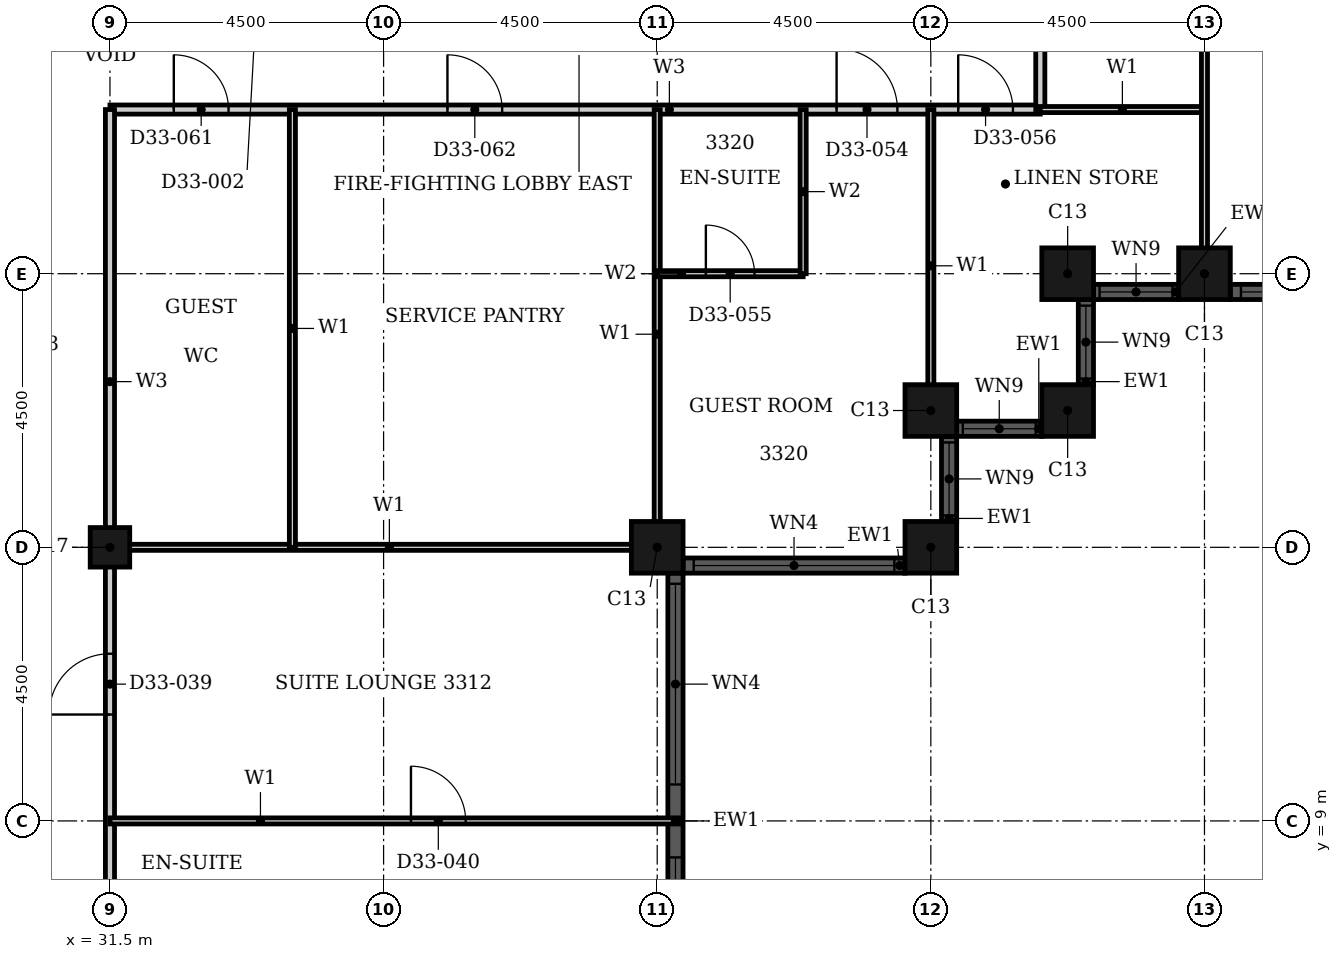
"""IFC4 building model, lengths in metres.
Left out: names, types, materials, properties, quantities, classifications, styles, units other than length and angle.
Written with IfcOpenShell. Run it as: python <this file> out.ifc"""

import sys

from ifc_helpers import new_model, si_unit, direction, frame, frame_2d, origin, origin_2d, place, context, subcontext, project, spatial, rectangle, hollow_rectangle, extrude, element, fill, save


model = new_model("IFC4")
c1 = context("Model", 3, precision=1e-05, world=origin(), true_north=direction((0.0, 1.0)))
c2 = subcontext(c1, "Body", "Model", "MODEL_VIEW")
j1 = project(units=[si_unit("LENGTHUNIT", "METRE"), si_unit("PLANEANGLEUNIT", "RADIAN")], contexts=[c1])
p1 = place(None, origin())
s1 = spatial("IfcSite", under=j1, at=p1, CompositionType="ELEMENT")
p2 = place(p1, origin())
s2 = spatial("IfcBuilding", under=s1, at=p2, CompositionType="ELEMENT")
p3 = place(p2, frame((0.0, 0.0, 133.2)))
s3 = spatial("IfcBuildingStorey", under=s2, at=p3, CompositionType="ELEMENT", Elevation=133.2)
for number, where, z_axis, x_axis in (
    (1, (40.5, 13.5, 0.0), (0.0, 0.0, 1.0), (1.0, 0.0, 0.0)),
    (2, (45.0, 13.5, 0.0), (0.0, 0.0, 1.0), (1.0, 0.0, 0.0)),
    (3, (45.0, 15.75, 0.0), (0.0, 0.0, 1.0), (1.0, 0.0, 0.0)),
    (4, (47.25, 15.75, 0.0), (0.0, 0.0, 1.0), (1.0, 0.0, 0.0)),
    (5, (47.25, 18.0, 0.0), (0.0, 0.0, 1.0), (1.0, 0.0, 0.0)),
    (6, (49.5, 18.0, 0.0), (0.0, 0.0, 1.0), (1.0, 0.0, 0.0)),
):
    element("IfcColumn", number, at=place(p3, frame(where, z_axis=z_axis, x_axis=x_axis)), inside=s3, PredefinedType="COLUMN", context=c2, shape_type="SweptSolid", body=[
        extrude(hollow_rectangle(XDim=0.85, YDim=0.85, WallThickness=0.026, at=origin_2d()), origin(), (0.0, 0.0, 1.0), 3.6),
    ])
p4 = place(p3, frame((31.5, 13.5, 0.0), z_axis=(0.0, 0.0, 1.0), x_axis=(1.0, 0.0, 0.0)))
e7 = element("IfcColumn", 7, at=p4, inside=s3, PredefinedType="COLUMN", context=c2, shape_type="SweptSolid", body=[
    extrude(hollow_rectangle(XDim=0.65, YDim=0.65, WallThickness=0.021, at=origin_2d()), origin(), (0.0, 0.0, 1.0), 3.6),
])
p5 = place(p3, frame((40.8, 4.925, 0.0), z_axis=(0.0, 0.0, 1.0), x_axis=(0.0, 1.0, 0.0)))
e8 = element("IfcWall", 8, at=p5, inside=s3, PredefinedType="SOLIDWALL", context=c2, shape_type="SweptSolid", body=[
    extrude(rectangle(XDim=8.15, YDim=0.25, at=frame_2d((4.075, 0.0))), origin(), (0.0, 0.0, 1.0), 3.6),
])
p6 = place(p5, frame((0.175, 0.0, 0.9)))
e9 = element("IfcOpeningElement", 9, at=p6, cuts=e8, PredefinedType="OPENING", context=c2, shape_type="SweptSolid", body=[
    extrude(rectangle(XDim=3.3, YDim=2.08, at=frame_2d((1.65, 1.04))), frame((0.0, 0.135, 0.0), z_axis=(0.0, -1.0, 0.0), x_axis=(1.0, 0.0, 0.0)), (0.0, 0.0, 1.0), 0.27),
])
p7 = place(p5, frame((4.675, 0.0, 0.9)))
e10 = element("IfcOpeningElement", 10, at=p7, cuts=e8, PredefinedType="OPENING", context=c2, shape_type="SweptSolid", body=[
    extrude(rectangle(XDim=3.3, YDim=2.08, at=frame_2d((1.65, 1.04))), frame((0.0, 0.135, 0.0), z_axis=(0.0, -1.0, 0.0), x_axis=(1.0, 0.0, 0.0)), (0.0, 0.0, 1.0), 0.27),
])
p8 = place(p3, frame((40.925, 13.2, 0.0), z_axis=(0.0, 0.0, 1.0), x_axis=(1.0, 0.0, 0.0)))
e11 = element("IfcWall", 11, at=p8, inside=s3, PredefinedType="SOLIDWALL", context=c2, shape_type="SweptSolid", body=[
    extrude(rectangle(XDim=3.65, YDim=0.25, at=frame_2d((1.825, 0.0))), origin(), (0.0, 0.0, 1.0), 3.6),
])
p9 = place(p8, frame((0.175, 0.0, 0.9)))
e12 = element("IfcOpeningElement", 12, at=p9, cuts=e11, PredefinedType="OPENING", context=c2, shape_type="SweptSolid", body=[
    extrude(rectangle(XDim=3.3, YDim=2.08, at=frame_2d((1.65, 1.04))), frame((0.0, 0.135, 0.0), z_axis=(0.0, -1.0, 0.0), x_axis=(1.0, 0.0, 0.0)), (0.0, 0.0, 1.0), 0.27),
])
p10 = place(p3, frame((45.3, 13.925, 0.0), z_axis=(0.0, 0.0, 1.0), x_axis=(0.0, 1.0, 0.0)))
e13 = element("IfcWall", 13, at=p10, inside=s3, PredefinedType="SOLIDWALL", context=c2, shape_type="SweptSolid", body=[
    extrude(rectangle(XDim=1.4, YDim=0.25, at=frame_2d((0.7, 0.0))), origin(), (0.0, 0.0, 1.0), 3.6),
])
p11 = place(p10, frame((0.1, 0.0, 0.9)))
e14 = element("IfcOpeningElement", 14, at=p11, cuts=e13, PredefinedType="OPENING", context=c2, shape_type="SweptSolid", body=[
    extrude(rectangle(XDim=1.2, YDim=2.08, at=frame_2d((0.6, 1.04))), frame((0.0, 0.135, 0.0), z_axis=(0.0, -1.0, 0.0), x_axis=(1.0, 0.0, 0.0)), (0.0, 0.0, 1.0), 0.27),
])
p12 = place(p3, frame((45.425, 15.45, 0.0), z_axis=(0.0, 0.0, 1.0), x_axis=(1.0, 0.0, 0.0)))
e15 = element("IfcWall", 15, at=p12, inside=s3, PredefinedType="SOLIDWALL", context=c2, shape_type="SweptSolid", body=[
    extrude(rectangle(XDim=1.4, YDim=0.25, at=frame_2d((0.7, 0.0))), origin(), (0.0, 0.0, 1.0), 3.6),
])
p13 = place(p12, frame((0.1, 0.0, 0.9)))
e16 = element("IfcOpeningElement", 16, at=p13, cuts=e15, PredefinedType="OPENING", context=c2, shape_type="SweptSolid", body=[
    extrude(rectangle(XDim=1.2, YDim=2.08, at=frame_2d((0.6, 1.04))), frame((0.0, 0.135, 0.0), z_axis=(0.0, -1.0, 0.0), x_axis=(1.0, 0.0, 0.0)), (0.0, 0.0, 1.0), 0.27),
])
p14 = place(p3, frame((47.55, 16.175, 0.0), z_axis=(0.0, 0.0, 1.0), x_axis=(0.0, 1.0, 0.0)))
e17 = element("IfcWall", 17, at=p14, inside=s3, PredefinedType="SOLIDWALL", context=c2, shape_type="SweptSolid", body=[
    extrude(rectangle(XDim=1.4, YDim=0.25, at=frame_2d((0.7, 0.0))), origin(), (0.0, 0.0, 1.0), 3.6),
])
p15 = place(p14, frame((0.1, 0.0, 0.9)))
e18 = element("IfcOpeningElement", 18, at=p15, cuts=e17, PredefinedType="OPENING", context=c2, shape_type="SweptSolid", body=[
    extrude(rectangle(XDim=1.2, YDim=2.08, at=frame_2d((0.6, 1.04))), frame((0.0, 0.135, 0.0), z_axis=(0.0, -1.0, 0.0), x_axis=(1.0, 0.0, 0.0)), (0.0, 0.0, 1.0), 0.27),
])
p16 = place(p3, frame((47.675, 17.7, 0.0), z_axis=(0.0, 0.0, 1.0), x_axis=(1.0, 0.0, 0.0)))
e19 = element("IfcWall", 19, at=p16, inside=s3, PredefinedType="SOLIDWALL", context=c2, shape_type="SweptSolid", body=[
    extrude(rectangle(XDim=1.4, YDim=0.25, at=frame_2d((0.7, 0.0))), origin(), (0.0, 0.0, 1.0), 3.6),
])
p17 = place(p16, frame((0.1, 0.0, 0.9)))
e20 = element("IfcOpeningElement", 20, at=p17, cuts=e19, PredefinedType="OPENING", context=c2, shape_type="SweptSolid", body=[
    extrude(rectangle(XDim=1.2, YDim=2.08, at=frame_2d((0.6, 1.04))), frame((0.0, 0.135, 0.0), z_axis=(0.0, -1.0, 0.0), x_axis=(1.0, 0.0, 0.0)), (0.0, 0.0, 1.0), 0.27),
])
p18 = place(p3, frame((49.925, 17.7, 0.0), z_axis=(0.0, 0.0, 1.0), x_axis=(1.0, 0.0, 0.0)))
e21 = element("IfcWall", 21, at=p18, inside=s3, PredefinedType="SOLIDWALL", context=c2, shape_type="SweptSolid", body=[
    extrude(rectangle(XDim=8.15, YDim=0.25, at=frame_2d((4.075, 0.0))), origin(), (0.0, 0.0, 1.0), 3.6),
])
p19 = place(p18, frame((0.175, 0.0, 0.9)))
e22 = element("IfcOpeningElement", 22, at=p19, cuts=e21, PredefinedType="OPENING", context=c2, shape_type="SweptSolid", body=[
    extrude(rectangle(XDim=3.3, YDim=2.08, at=frame_2d((1.65, 1.04))), frame((0.0, 0.135, 0.0), z_axis=(0.0, -1.0, 0.0), x_axis=(1.0, 0.0, 0.0)), (0.0, 0.0, 1.0), 0.27),
])
p20 = place(p18, frame((4.675, 0.0, 0.9)))
e23 = element("IfcOpeningElement", 23, at=p20, cuts=e21, PredefinedType="OPENING", context=c2, shape_type="SweptSolid", body=[
    extrude(rectangle(XDim=3.3, YDim=2.08, at=frame_2d((1.65, 1.04))), frame((0.0, 0.135, 0.0), z_axis=(0.0, -1.0, 0.0), x_axis=(1.0, 0.0, 0.0)), (0.0, 0.0, 1.0), 0.27),
])
p21 = place(p3, frame((31.5, 20.7, 0.0), z_axis=(0.0, 0.0, 1.0), x_axis=(1.0, 0.0, 0.0)))
e24 = element("IfcWall", 24, at=p21, inside=s3, PredefinedType="PARTITIONING", context=c2, shape_type="SweptSolid", body=[
    extrude(rectangle(XDim=15.3, YDim=0.15, at=frame_2d((7.65, 0.0))), origin(), (0.0, 0.0, 1.0), 3.3),
])
p22 = place(p21, frame((11.95, 0.0, 0.0)))
e25 = element("IfcOpeningElement", 25, at=p22, cuts=e24, PredefinedType="OPENING", context=c2, shape_type="SweptSolid", body=[
    extrude(rectangle(XDim=1.0, YDim=2.1, at=frame_2d((0.5, 1.05))), frame((0.0, 0.085, 0.0), z_axis=(0.0, -1.0, 0.0), x_axis=(1.0, 0.0, 0.0)), (0.0, 0.0, 1.0), 0.17),
])
p23 = place(p21, frame((13.95, 0.0, 0.0)))
e26 = element("IfcOpeningElement", 26, at=p23, cuts=e24, PredefinedType="OPENING", context=c2, shape_type="SweptSolid", body=[
    extrude(rectangle(XDim=0.9, YDim=2.1, at=frame_2d((0.45, 1.05))), frame((0.0, 0.085, 0.0), z_axis=(0.0, -1.0, 0.0), x_axis=(1.0, 0.0, 0.0)), (0.0, 0.0, 1.0), 0.17),
])
p24 = place(p21, frame((1.05, 0.0, 0.0)))
e27 = element("IfcOpeningElement", 27, at=p24, cuts=e24, PredefinedType="OPENING", context=c2, shape_type="SweptSolid", body=[
    extrude(rectangle(XDim=0.9, YDim=2.1, at=frame_2d((0.45, 1.05))), frame((0.0, 0.085, 0.0), z_axis=(0.0, -1.0, 0.0), x_axis=(1.0, 0.0, 0.0)), (0.0, 0.0, 1.0), 0.17),
])
p25 = place(p21, frame((5.55, 0.0, 0.0)))
e28 = element("IfcOpeningElement", 28, at=p25, cuts=e24, PredefinedType="OPENING", context=c2, shape_type="SweptSolid", body=[
    extrude(rectangle(XDim=0.9, YDim=2.1, at=frame_2d((0.45, 1.05))), frame((0.0, 0.085, 0.0), z_axis=(0.0, -1.0, 0.0), x_axis=(1.0, 0.0, 0.0)), (0.0, 0.0, 1.0), 0.17),
])
p26 = place(p3, frame((31.5, 4.5, 0.0), z_axis=(0.0, 0.0, 1.0), x_axis=(0.0, 1.0, 0.0)))
e29 = element("IfcWall", 29, at=p26, inside=s3, PredefinedType="PARTITIONING", context=c2, shape_type="SweptSolid", body=[
    extrude(rectangle(XDim=16.2, YDim=0.15, at=frame_2d((8.1, 0.0))), origin(), (0.0, 0.0, 1.0), 2.58),
])
p27 = place(p26, frame((6.25, 0.0, 0.0)))
e30 = element("IfcOpeningElement", 30, at=p27, cuts=e29, PredefinedType="OPENING", context=c2, shape_type="SweptSolid", body=[
    extrude(rectangle(XDim=1.0, YDim=2.1, at=frame_2d((0.5, 1.05))), frame((0.0, 0.085, 0.0), z_axis=(0.0, -1.0, 0.0), x_axis=(1.0, 0.0, 0.0)), (0.0, 0.0, 1.0), 0.17),
])
p28 = place(p3, frame((46.8, 20.7, 0.0), z_axis=(0.0, 0.0, 1.0), x_axis=(0.0, 1.0, 0.0)))
e31 = element("IfcWall", 31, at=p28, inside=s3, PredefinedType="PARTITIONING", context=c2, shape_type="SweptSolid", body=[
    extrude(rectangle(XDim=6.3, YDim=0.15, at=frame_2d((3.15, 0.0))), origin(), (0.0, 0.0, 1.0), 3.3),
])
p29 = place(p28, frame((2.65, 0.0, 0.0)))
e32 = element("IfcOpeningElement", 32, at=p29, cuts=e31, PredefinedType="OPENING", context=c2, shape_type="SweptSolid", body=[
    extrude(rectangle(XDim=0.9, YDim=2.1, at=frame_2d((0.45, 1.05))), frame((0.0, 0.085, 0.0), z_axis=(0.0, -1.0, 0.0), x_axis=(1.0, 0.0, 0.0)), (0.0, 0.0, 1.0), 0.17),
])
p30 = place(p3, frame((31.5, 13.5, 0.0), z_axis=(0.0, 0.0, 1.0), x_axis=(1.0, 0.0, 0.0)))
e33 = element("IfcWall", 33, at=p30, inside=s3, PredefinedType="PARTITIONING", context=c2, shape_type="SweptSolid", body=[
    extrude(rectangle(XDim=9.19, YDim=0.1, at=frame_2d((4.595, 0.0))), origin(), (0.0, 0.0, 1.0), 2.38),
])
p31 = place(p3, frame((46.8, 20.7, 0.0), z_axis=(0.0, 0.0, 1.0), x_axis=(1.0, 0.0, 0.0)))
e34 = element("IfcWall", 34, at=p31, inside=s3, PredefinedType="PARTITIONING", context=c2, shape_type="SweptSolid", body=[
    extrude(rectangle(XDim=2.7, YDim=0.1, at=frame_2d((1.35, 0.0))), origin(), (0.0, 0.0, 1.0), 3.3),
])
p32 = place(p3, frame((31.5, 9.0, 0.0), z_axis=(0.0, 0.0, 1.0), x_axis=(1.0, 0.0, 0.0)))
e35 = element("IfcWall", 35, at=p32, inside=s3, PredefinedType="PARTITIONING", context=c2, shape_type="SweptSolid", body=[
    extrude(rectangle(XDim=9.365, YDim=0.1, at=frame_2d((4.683, 0.0))), origin(), (0.0, 0.0, 1.0), 3.3),
])
p33 = place(p32, frame((4.95, 0.0, 0.0)))
e36 = element("IfcOpeningElement", 36, at=p33, cuts=e35, PredefinedType="OPENING", context=c2, shape_type="SweptSolid", body=[
    extrude(rectangle(XDim=0.9, YDim=2.1, at=frame_2d((0.45, 1.05))), frame((0.0, 0.06, 0.0), z_axis=(0.0, -1.0, 0.0), x_axis=(1.0, 0.0, 0.0)), (0.0, 0.0, 1.0), 0.12),
])
p34 = place(p3, frame((34.5, 13.5, 0.0), z_axis=(0.0, 0.0, 1.0), x_axis=(0.0, 1.0, 0.0)))
e37 = element("IfcWall", 37, at=p34, inside=s3, PredefinedType="PARTITIONING", context=c2, shape_type="SweptSolid", body=[
    extrude(rectangle(XDim=7.2, YDim=0.1, at=frame_2d((3.6, 0.0))), origin(), (0.0, 0.0, 1.0), 3.3),
])
p35 = place(p3, frame((40.5, 13.31, 0.0), z_axis=(0.0, 0.0, 1.0), x_axis=(0.0, 1.0, 0.0)))
e38 = element("IfcWall", 38, at=p35, inside=s3, PredefinedType="PARTITIONING", context=c2, shape_type="SweptSolid", body=[
    extrude(rectangle(XDim=7.39, YDim=0.1, at=frame_2d((3.695, 0.0))), origin(), (0.0, 0.0, 1.0), 3.3),
])
p36 = place(p3, frame((45.0, 15.56, 0.0), z_axis=(0.0, 0.0, 1.0), x_axis=(0.0, 1.0, 0.0)))
e39 = element("IfcWall", 39, at=p36, inside=s3, PredefinedType="PARTITIONING", context=c2, shape_type="SweptSolid", body=[
    extrude(rectangle(XDim=5.14, YDim=0.1, at=frame_2d((2.57, 0.0))), origin(), (0.0, 0.0, 1.0), 3.3),
])
p37 = place(p3, frame((49.5, 17.81, 0.0), z_axis=(0.0, 0.0, 1.0), x_axis=(0.0, 1.0, 0.0)))
e40 = element("IfcWall", 40, at=p37, inside=s3, PredefinedType="PARTITIONING", context=c2, shape_type="SweptSolid", body=[
    extrude(rectangle(XDim=9.19, YDim=0.1, at=frame_2d((4.595, 0.0))), origin(), (0.0, 0.0, 1.0), 2.38),
])
p38 = place(p3, frame((40.5, 18.0, 0.0), z_axis=(0.0, 0.0, 1.0), x_axis=(1.0, 0.0, 0.0)))
e41 = element("IfcWall", 41, at=p38, inside=s3, PredefinedType="PARTITIONING", context=c2, shape_type="SweptSolid", body=[
    extrude(rectangle(XDim=2.4, YDim=0.1, at=frame_2d((1.2, 0.0))), origin(), (0.0, 0.0, 1.0), 3.3),
])
p39 = place(p38, frame((0.8, 0.0, 0.0)))
e42 = element("IfcOpeningElement", 42, at=p39, cuts=e41, PredefinedType="OPENING", context=c2, shape_type="SweptSolid", body=[
    extrude(rectangle(XDim=0.8, YDim=2.1, at=frame_2d((0.4, 1.05))), frame((0.0, 0.06, 0.0), z_axis=(0.0, -1.0, 0.0), x_axis=(1.0, 0.0, 0.0)), (0.0, 0.0, 1.0), 0.12),
])
p40 = place(p3, frame((42.9, 18.0, 0.0), z_axis=(0.0, 0.0, 1.0), x_axis=(0.0, 1.0, 0.0)))
e43 = element("IfcWall", 43, at=p40, inside=s3, PredefinedType="PARTITIONING", context=c2, shape_type="SweptSolid", body=[
    extrude(rectangle(XDim=2.7, YDim=0.1, at=frame_2d((1.35, 0.0))), origin(), (0.0, 0.0, 1.0), 3.3),
])
p41 = place(p6, origin())
e44 = element("IfcWindow", 44, at=p41, inside=s3, PartitioningType="SINGLE_PANEL", PredefinedType="WINDOW", context=c2, shape_type="SweptSolid", body=[
    extrude(rectangle(XDim=3.3, YDim=2.08, at=frame_2d((1.65, 1.04))), frame((0.0, 0.03, 0.0), z_axis=(0.0, -1.0, 0.0), x_axis=(1.0, 0.0, 0.0)), (0.0, 0.0, 1.0), 0.06),
])
fill(e9, e44)
p42 = place(p7, origin())
e45 = element("IfcWindow", 45, at=p42, inside=s3, PartitioningType="SINGLE_PANEL", PredefinedType="WINDOW", context=c2, shape_type="SweptSolid", body=[
    extrude(rectangle(XDim=3.3, YDim=2.08, at=frame_2d((1.65, 1.04))), frame((0.0, 0.03, 0.0), z_axis=(0.0, -1.0, 0.0), x_axis=(1.0, 0.0, 0.0)), (0.0, 0.0, 1.0), 0.06),
])
fill(e10, e45)
p43 = place(p9, origin())
e46 = element("IfcWindow", 46, at=p43, inside=s3, PartitioningType="SINGLE_PANEL", PredefinedType="WINDOW", context=c2, shape_type="SweptSolid", body=[
    extrude(rectangle(XDim=3.3, YDim=2.08, at=frame_2d((1.65, 1.04))), frame((0.0, 0.03, 0.0), z_axis=(0.0, -1.0, 0.0), x_axis=(1.0, 0.0, 0.0)), (0.0, 0.0, 1.0), 0.06),
])
fill(e12, e46)
p44 = place(p11, origin())
e47 = element("IfcWindow", 47, at=p44, inside=s3, PartitioningType="SINGLE_PANEL", PredefinedType="WINDOW", context=c2, shape_type="SweptSolid", body=[
    extrude(rectangle(XDim=1.2, YDim=2.08, at=frame_2d((0.6, 1.04))), frame((0.0, 0.03, 0.0), z_axis=(0.0, -1.0, 0.0), x_axis=(1.0, 0.0, 0.0)), (0.0, 0.0, 1.0), 0.06),
])
fill(e14, e47)
p45 = place(p13, origin())
e48 = element("IfcWindow", 48, at=p45, inside=s3, PartitioningType="SINGLE_PANEL", PredefinedType="WINDOW", context=c2, shape_type="SweptSolid", body=[
    extrude(rectangle(XDim=1.2, YDim=2.08, at=frame_2d((0.6, 1.04))), frame((0.0, 0.03, 0.0), z_axis=(0.0, -1.0, 0.0), x_axis=(1.0, 0.0, 0.0)), (0.0, 0.0, 1.0), 0.06),
])
fill(e16, e48)
p46 = place(p15, origin())
e49 = element("IfcWindow", 49, at=p46, inside=s3, PartitioningType="SINGLE_PANEL", PredefinedType="WINDOW", context=c2, shape_type="SweptSolid", body=[
    extrude(rectangle(XDim=1.2, YDim=2.08, at=frame_2d((0.6, 1.04))), frame((0.0, 0.03, 0.0), z_axis=(0.0, -1.0, 0.0), x_axis=(1.0, 0.0, 0.0)), (0.0, 0.0, 1.0), 0.06),
])
fill(e18, e49)
p47 = place(p17, origin())
e50 = element("IfcWindow", 50, at=p47, inside=s3, PartitioningType="SINGLE_PANEL", PredefinedType="WINDOW", context=c2, shape_type="SweptSolid", body=[
    extrude(rectangle(XDim=1.2, YDim=2.08, at=frame_2d((0.6, 1.04))), frame((0.0, 0.03, 0.0), z_axis=(0.0, -1.0, 0.0), x_axis=(1.0, 0.0, 0.0)), (0.0, 0.0, 1.0), 0.06),
])
fill(e20, e50)
p48 = place(p19, origin())
e51 = element("IfcWindow", 51, at=p48, inside=s3, PartitioningType="SINGLE_PANEL", PredefinedType="WINDOW", context=c2, shape_type="SweptSolid", body=[
    extrude(rectangle(XDim=3.3, YDim=2.08, at=frame_2d((1.65, 1.04))), frame((0.0, 0.03, 0.0), z_axis=(0.0, -1.0, 0.0), x_axis=(1.0, 0.0, 0.0)), (0.0, 0.0, 1.0), 0.06),
])
fill(e22, e51)
p49 = place(p27, origin())
e52 = element("IfcDoor", 52, at=p49, inside=s3, OperationType="SINGLE_SWING_LEFT", PredefinedType="DOOR", context=c2, shape_type="SweptSolid", body=[
    extrude(rectangle(XDim=1.0, YDim=2.1, at=frame_2d((0.5, 1.05))), frame((0.0, 0.025, 0.0), z_axis=(0.0, -1.0, 0.0), x_axis=(1.0, 0.0, 0.0)), (0.0, 0.0, 1.0), 0.05),
])
fill(e30, e52)
p50 = place(p33, origin())
e53 = element("IfcDoor", 53, at=p50, inside=s3, OperationType="SINGLE_SWING_RIGHT", PredefinedType="DOOR", context=c2, shape_type="SweptSolid", body=[
    extrude(rectangle(XDim=0.9, YDim=2.1, at=frame_2d((0.45, 1.05))), frame((0.0, 0.025, 0.0), z_axis=(0.0, -1.0, 0.0), x_axis=(1.0, 0.0, 0.0)), (0.0, 0.0, 1.0), 0.05),
])
fill(e36, e53)
p51 = place(p22, origin())
e54 = element("IfcDoor", 54, at=p51, inside=s3, OperationType="SINGLE_SWING_RIGHT", PredefinedType="DOOR", context=c2, shape_type="SweptSolid", body=[
    extrude(rectangle(XDim=1.0, YDim=2.1, at=frame_2d((0.5, 1.05))), frame((0.0, 0.025, 0.0), z_axis=(0.0, -1.0, 0.0), x_axis=(1.0, 0.0, 0.0)), (0.0, 0.0, 1.0), 0.05),
])
fill(e25, e54)
p52 = place(p39, origin())
e55 = element("IfcDoor", 55, at=p52, inside=s3, OperationType="SINGLE_SWING_RIGHT", PredefinedType="DOOR", context=c2, shape_type="SweptSolid", body=[
    extrude(rectangle(XDim=0.8, YDim=2.1, at=frame_2d((0.4, 1.05))), frame((0.0, 0.025, 0.0), z_axis=(0.0, -1.0, 0.0), x_axis=(1.0, 0.0, 0.0)), (0.0, 0.0, 1.0), 0.05),
])
fill(e42, e55)
p53 = place(p23, origin())
e56 = element("IfcDoor", 56, at=p53, inside=s3, OperationType="SINGLE_SWING_RIGHT", PredefinedType="DOOR", context=c2, shape_type="SweptSolid", body=[
    extrude(rectangle(XDim=0.9, YDim=2.1, at=frame_2d((0.45, 1.05))), frame((0.0, 0.025, 0.0), z_axis=(0.0, -1.0, 0.0), x_axis=(1.0, 0.0, 0.0)), (0.0, 0.0, 1.0), 0.05),
])
fill(e26, e56)
p54 = place(p24, origin())
e57 = element("IfcDoor", 57, at=p54, inside=s3, OperationType="SINGLE_SWING_LEFT", PredefinedType="DOOR", context=c2, shape_type="SweptSolid", body=[
    extrude(rectangle(XDim=0.9, YDim=2.1, at=frame_2d((0.45, 1.05))), frame((0.0, 0.025, 0.0), z_axis=(0.0, -1.0, 0.0), x_axis=(1.0, 0.0, 0.0)), (0.0, 0.0, 1.0), 0.05),
])
fill(e27, e57)
p55 = place(p25, origin())
e58 = element("IfcDoor", 58, at=p55, inside=s3, OperationType="SINGLE_SWING_LEFT", PredefinedType="DOOR", context=c2, shape_type="SweptSolid", body=[
    extrude(rectangle(XDim=0.9, YDim=2.1, at=frame_2d((0.45, 1.05))), frame((0.0, 0.025, 0.0), z_axis=(0.0, -1.0, 0.0), x_axis=(1.0, 0.0, 0.0)), (0.0, 0.0, 1.0), 0.05),
])
fill(e28, e58)
save(model, sys.argv[1])
